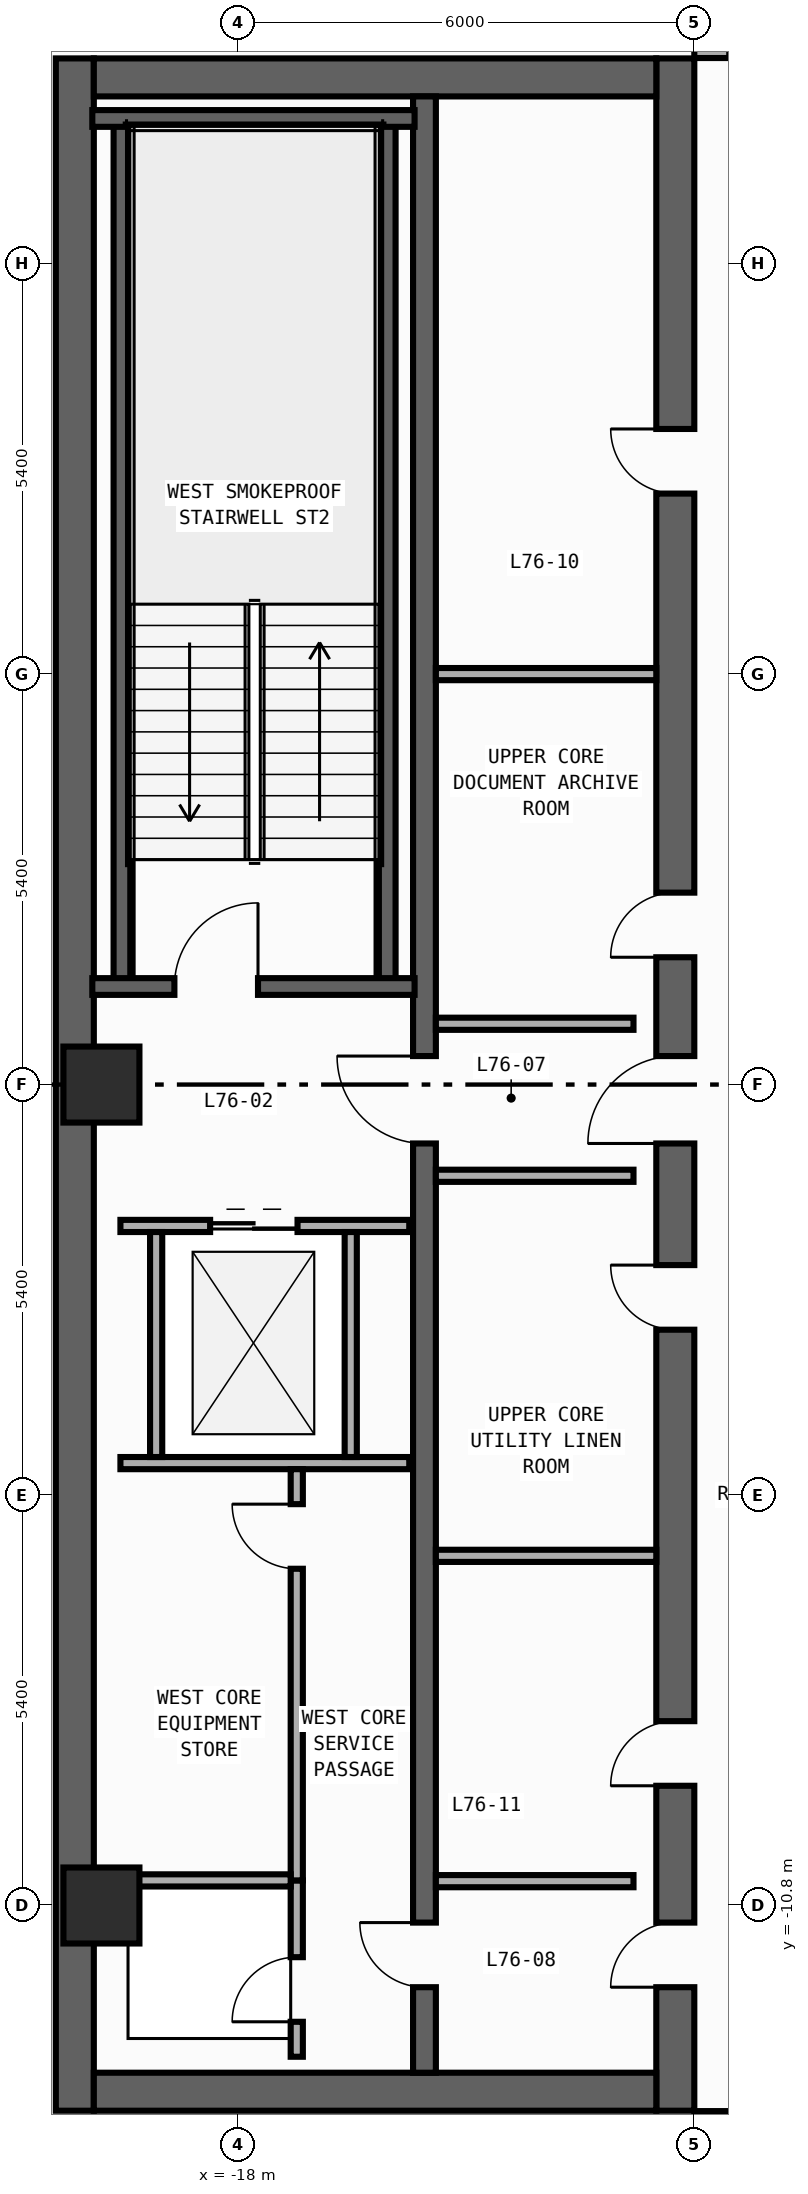
"""IFC4 building model, lengths in metres.
Left out: names, types, materials, properties, quantities, classifications, styles, units other than length and angle.
Written with IfcOpenShell. Run it as: python <this file> out.ifc"""

import sys

from ifc_helpers import new_model, si_unit, direction, frame, frame_2d, origin, origin_2d, place, context, subcontext, project, spatial, rectangle, circle, extrude, element, fill, save


model = new_model("IFC4")
c1 = context("Model", 3, precision=1e-05, world=origin(), true_north=direction((0.0, 1.0)))
c2 = subcontext(c1, "Body", "Model", "MODEL_VIEW")
j1 = project(units=[si_unit("LENGTHUNIT", "METRE"), si_unit("PLANEANGLEUNIT", "RADIAN")], contexts=[c1])
p1 = place(None, origin())
s1 = spatial("IfcSite", under=j1, at=p1, CompositionType="ELEMENT")
p2 = place(p1, origin())
s2 = spatial("IfcBuilding", under=s1, at=p2, CompositionType="ELEMENT")
p3 = place(p2, frame((0.0, 0.0, 315.6)))
s3 = spatial("IfcBuildingStorey", under=s2, at=p3, CompositionType="ELEMENT", Elevation=315.6)
p4 = place(p3, frame((-20.15, -13.5, 0.0), z_axis=(0.0, 0.0, 1.0), x_axis=(0.0, 1.0, 0.0)))
e1 = element("IfcWall", 1, at=p4, inside=s3, PredefinedType="SHEAR", context=c2, shape_type="SweptSolid", body=[
    extrude(rectangle(XDim=27.0, YDim=0.5, at=frame_2d((13.5, 0.0))), origin(), (0.0, 0.0, 1.0), 4.54),
])
p5 = place(p3, frame((-12.25, -13.5, 0.0), z_axis=(0.0, 0.0, 1.0), x_axis=(0.0, 1.0, 0.0)))
e2 = element("IfcWall", 2, at=p5, inside=s3, PredefinedType="SHEAR", context=c2, shape_type="SweptSolid", body=[
    extrude(rectangle(XDim=27.0, YDim=0.5, at=frame_2d((13.5, 0.0))), origin(), (0.0, 0.0, 1.0), 4.54),
])
p6 = place(p5, frame((15.175, 0.0, 0.0)))
e3 = element("IfcOpeningElement", 3, at=p6, cuts=e2, PredefinedType="OPENING", context=c2, shape_type="SweptSolid", body=[
    extrude(rectangle(XDim=0.85, YDim=2.1, at=frame_2d((0.425, 1.05))), frame((0.0, 0.26, 0.0), z_axis=(0.0, -1.0, 0.0), x_axis=(1.0, 0.0, 0.0)), (0.0, 0.0, 1.0), 0.52),
])
p7 = place(p5, frame((21.275, 0.0, 0.0)))
e4 = element("IfcOpeningElement", 4, at=p7, cuts=e2, PredefinedType="OPENING", context=c2, shape_type="SweptSolid", body=[
    extrude(rectangle(XDim=0.85, YDim=2.1, at=frame_2d((0.425, 1.05))), frame((0.0, 0.26, 0.0), z_axis=(0.0, -1.0, 0.0), x_axis=(1.0, 0.0, 0.0)), (0.0, 0.0, 1.0), 0.52),
])
p8 = place(p5, frame((4.275, 0.0, 0.0)))
e5 = element("IfcOpeningElement", 5, at=p8, cuts=e2, PredefinedType="OPENING", context=c2, shape_type="SweptSolid", body=[
    extrude(rectangle(XDim=0.85, YDim=2.1, at=frame_2d((0.425, 1.05))), frame((0.0, 0.26, 0.0), z_axis=(0.0, -1.0, 0.0), x_axis=(1.0, 0.0, 0.0)), (0.0, 0.0, 1.0), 0.52),
])
p9 = place(p5, frame((10.275, 0.0, 0.0)))
e6 = element("IfcOpeningElement", 6, at=p9, cuts=e2, PredefinedType="OPENING", context=c2, shape_type="SweptSolid", body=[
    extrude(rectangle(XDim=0.85, YDim=2.1, at=frame_2d((0.425, 1.05))), frame((0.0, 0.26, 0.0), z_axis=(0.0, -1.0, 0.0), x_axis=(1.0, 0.0, 0.0)), (0.0, 0.0, 1.0), 0.52),
])
p10 = place(p5, frame((12.725, 0.0, 0.0)))
e7 = element("IfcOpeningElement", 7, at=p10, cuts=e2, PredefinedType="OPENING", context=c2, shape_type="SweptSolid", body=[
    extrude(rectangle(XDim=1.15, YDim=2.2, at=frame_2d((0.575, 1.1))), frame((0.0, 0.26, 0.0), z_axis=(0.0, -1.0, 0.0), x_axis=(1.0, 0.0, 0.0)), (0.0, 0.0, 1.0), 0.52),
])
p11 = place(p5, frame((1.625, 0.0, 0.0)))
e8 = element("IfcOpeningElement", 8, at=p11, cuts=e2, PredefinedType="OPENING", context=c2, shape_type="SweptSolid", body=[
    extrude(rectangle(XDim=0.85, YDim=2.1, at=frame_2d((0.425, 1.05))), frame((0.0, 0.26, 0.0), z_axis=(0.0, -1.0, 0.0), x_axis=(1.0, 0.0, 0.0)), (0.0, 0.0, 1.0), 0.52),
])
for number, where, z_axis, x_axis in (
    (9, (-19.9, -13.25, 0.0), (0.0, 0.0, 1.0), (1.0, 0.0, 0.0)),
    (10, (-19.9, 13.25, 0.0), (0.0, 0.0, 1.0), (1.0, 0.0, 0.0)),
):
    element("IfcWall", number, at=place(p3, frame(where, z_axis=z_axis, x_axis=x_axis)), inside=s3, PredefinedType="SHEAR", context=c2, shape_type="SweptSolid", body=[
        extrude(rectangle(XDim=7.4, YDim=0.5, at=frame_2d((3.7, 0.0))), origin(), (0.0, 0.0, 1.0), 4.54),
    ])
p12 = place(p3, frame((-15.55, -13.0, 0.0), z_axis=(0.0, 0.0, 1.0), x_axis=(0.0, 1.0, 0.0)))
e11 = element("IfcWall", 11, at=p12, inside=s3, PredefinedType="SHEAR", context=c2, shape_type="SweptSolid", body=[
    extrude(rectangle(XDim=26.0, YDim=0.3, at=frame_2d((13.0, 0.0))), origin(), (0.0, 0.0, 1.0), 4.54),
])
p13 = place(p12, frame((12.225, 0.0, 0.0)))
e12 = element("IfcOpeningElement", 12, at=p13, cuts=e11, PredefinedType="OPENING", context=c2, shape_type="SweptSolid", body=[
    extrude(rectangle(XDim=1.15, YDim=2.2, at=frame_2d((0.575, 1.1))), frame((0.0, 0.16, 0.0), z_axis=(0.0, -1.0, 0.0), x_axis=(1.0, 0.0, 0.0)), (0.0, 0.0, 1.0), 0.32),
])
p14 = place(p12, frame((1.125, 0.0, 0.0)))
e13 = element("IfcOpeningElement", 13, at=p14, cuts=e11, PredefinedType="OPENING", context=c2, shape_type="SweptSolid", body=[
    extrude(rectangle(XDim=0.85, YDim=2.1, at=frame_2d((0.425, 1.05))), frame((0.0, 0.16, 0.0), z_axis=(0.0, -1.0, 0.0), x_axis=(1.0, 0.0, 0.0)), (0.0, 0.0, 1.0), 0.32),
])
for number, where, z_axis, x_axis in (
    (14, (-16.04, 1.29, 0.0), (0.0, 0.0, 1.0), (0.0, 1.0, 0.0)),
    (15, (-19.53, 1.29, 0.0), (0.0, 0.0, 1.0), (0.0, 1.0, 0.0)),
):
    element("IfcWall", number, at=place(p3, frame(where, z_axis=z_axis, x_axis=x_axis)), inside=s3, PredefinedType="SHEAR", context=c2, shape_type="SweptSolid", body=[
        extrude(rectangle(XDim=11.42, YDim=0.22, at=frame_2d((5.71, 0.0))), origin(), (0.0, 0.0, 1.0), 4.54),
    ])
p15 = place(p3, frame((-19.92, 12.71, 0.0), z_axis=(0.0, 0.0, 1.0), x_axis=(1.0, 0.0, 0.0)))
e16 = element("IfcWall", 16, at=p15, inside=s3, PredefinedType="SHEAR", context=c2, shape_type="SweptSolid", body=[
    extrude(rectangle(XDim=4.24, YDim=0.22, at=frame_2d((2.12, 0.0))), origin(), (0.0, 0.0, 1.0), 4.54),
])
p16 = place(p3, frame((-19.92, 1.29, 0.0), z_axis=(0.0, 0.0, 1.0), x_axis=(1.0, 0.0, 0.0)))
e17 = element("IfcWall", 17, at=p16, inside=s3, PredefinedType="SHEAR", context=c2, shape_type="SweptSolid", body=[
    extrude(rectangle(XDim=4.24, YDim=0.22, at=frame_2d((2.12, 0.0))), origin(), (0.0, 0.0, 1.0), 4.54),
])
p17 = place(p16, frame((1.08, 0.0, 0.0)))
e18 = element("IfcOpeningElement", 18, at=p17, cuts=e17, PredefinedType="OPENING", context=c2, shape_type="SweptSolid", body=[
    extrude(rectangle(XDim=1.1, YDim=2.2, at=frame_2d((0.55, 1.1))), frame((0.0, 0.12, 0.0), z_axis=(0.0, -1.0, 0.0), x_axis=(1.0, 0.0, 0.0)), (0.0, 0.0, 1.0), 0.24),
])
for number, where, z_axis, x_axis in (
    (19, (-19.8, -10.8, 0.0), (0.0, 0.0, 1.0), (1.0, 0.0, 0.0)),
    (20, (-19.8, 0.0, 0.0), (0.0, 0.0, 1.0), (1.0, 0.0, 0.0)),
):
    element("IfcColumn", number, at=place(p3, frame(where, z_axis=z_axis, x_axis=x_axis)), inside=s3, PredefinedType="COLUMN", context=c2, shape_type="SweptSolid", body=[
        extrude(circle(Radius=0.5, at=origin_2d()), origin(), (0.0, 0.0, 1.0), 4.8),
    ])
p18 = place(p3, frame((-19.55, -1.86, 0.0), z_axis=(0.0, 0.0, 1.0), x_axis=(1.0, 0.0, 0.0)))
e21 = element("IfcWall", 21, at=p18, inside=s3, PredefinedType="STANDARD", context=c2, shape_type="SweptSolid", body=[
    extrude(rectangle(XDim=3.8, YDim=0.16, at=frame_2d((1.9, 0.0))), origin(), (0.0, 0.0, 1.0), 4.54),
])
p19 = place(p18, frame((1.18, 0.0, 0.0)))
e22 = element("IfcOpeningElement", 22, at=p19, cuts=e21, PredefinedType="OPENING", context=c2, shape_type="SweptSolid", body=[
    extrude(rectangle(XDim=1.15, YDim=2.2, at=frame_2d((0.575, 1.1))), frame((0.0, 0.09, 0.0), z_axis=(0.0, -1.0, 0.0), x_axis=(1.0, 0.0, 0.0)), (0.0, 0.0, 1.0), 0.18),
])
p20 = place(p3, frame((-19.55, -4.98, 0.0), z_axis=(0.0, 0.0, 1.0), x_axis=(1.0, 0.0, 0.0)))
e23 = element("IfcWall", 23, at=p20, inside=s3, PredefinedType="STANDARD", context=c2, shape_type="SweptSolid", body=[
    extrude(rectangle(XDim=3.8, YDim=0.16, at=frame_2d((1.9, 0.0))), origin(), (0.0, 0.0, 1.0), 4.54),
])
for number, where, z_axis, x_axis in (
    (24, (-19.08, -4.9, 0.0), (0.0, 0.0, 1.0), (0.0, 1.0, 0.0)),
    (25, (-16.52, -4.9, 0.0), (0.0, 0.0, 1.0), (0.0, 1.0, 0.0)),
):
    element("IfcWall", number, at=place(p3, frame(where, z_axis=z_axis, x_axis=x_axis)), inside=s3, PredefinedType="STANDARD", context=c2, shape_type="SweptSolid", body=[
        extrude(rectangle(XDim=2.96, YDim=0.16, at=frame_2d((1.48, 0.0))), origin(), (0.0, 0.0, 1.0), 4.54),
    ])
for number, where, z_axis, x_axis in (
    (26, (-15.4, 0.8, 0.0), (0.0, 0.0, 1.0), (1.0, 0.0, 0.0)),
    (27, (-15.4, -1.2, 0.0), (0.0, 0.0, 1.0), (1.0, 0.0, 0.0)),
    (28, (-15.4, -10.48, 0.0), (0.0, 0.0, 1.0), (1.0, 0.0, 0.0)),
):
    element("IfcWall", number, at=place(p3, frame(where, z_axis=z_axis, x_axis=x_axis)), inside=s3, PredefinedType="STANDARD", context=c2, shape_type="SweptSolid", body=[
        extrude(rectangle(XDim=2.6, YDim=0.16, at=frame_2d((1.3, 0.0))), origin(), (0.0, 0.0, 1.0), 4.54),
    ])
p21 = place(p3, frame((-17.23, -12.79, 0.0), z_axis=(0.0, 0.0, 1.0), x_axis=(0.0, 1.0, 0.0)))
e29 = element("IfcWall", 29, at=p21, inside=s3, PredefinedType="PARTITIONING", context=c2, shape_type="SweptSolid", body=[
    extrude(rectangle(XDim=2.32, YDim=0.16, at=frame_2d((1.16, 0.0))), origin(), (0.0, 0.0, 1.0), 4.54),
])
p22 = place(p21, frame((0.46, 0.0, 0.0)))
e30 = element("IfcOpeningElement", 30, at=p22, cuts=e29, PredefinedType="OPENING", context=c2, shape_type="SweptSolid", body=[
    extrude(rectangle(XDim=0.85, YDim=2.1, at=frame_2d((0.425, 1.05))), frame((0.0, 0.09, 0.0), z_axis=(0.0, -1.0, 0.0), x_axis=(1.0, 0.0, 0.0)), (0.0, 0.0, 1.0), 0.18),
])
p23 = place(p3, frame((-17.23, -10.47, 0.0), z_axis=(0.0, 0.0, 1.0), x_axis=(0.0, 1.0, 0.0)))
e31 = element("IfcWall", 31, at=p23, inside=s3, PredefinedType="PARTITIONING", context=c2, shape_type="SweptSolid", body=[
    extrude(rectangle(XDim=5.41, YDim=0.16, at=frame_2d((2.705, 0.0))), origin(), (0.0, 0.0, 1.0), 4.54),
])
p24 = place(p23, frame((4.1, 0.0, 0.0)))
e32 = element("IfcOpeningElement", 32, at=p24, cuts=e31, PredefinedType="OPENING", context=c2, shape_type="SweptSolid", body=[
    extrude(rectangle(XDim=0.85, YDim=2.1, at=frame_2d((0.425, 1.05))), frame((0.0, 0.09, 0.0), z_axis=(0.0, -1.0, 0.0), x_axis=(1.0, 0.0, 0.0)), (0.0, 0.0, 1.0), 0.18),
])
p25 = place(p3, frame((-19.75, -10.47, 0.0), z_axis=(0.0, 0.0, 1.0), x_axis=(1.0, 0.0, 0.0)))
e33 = element("IfcWall", 33, at=p25, inside=s3, PredefinedType="PARTITIONING", context=c2, shape_type="SweptSolid", body=[
    extrude(rectangle(XDim=2.44, YDim=0.16, at=frame_2d((1.22, 0.0))), origin(), (0.0, 0.0, 1.0), 4.54),
])
for number, where, z_axis, x_axis in (
    (34, (-15.4, 5.4, 0.0), (0.0, 0.0, 1.0), (1.0, 0.0, 0.0)),
    (35, (-15.4, -6.2, 0.0), (0.0, 0.0, 1.0), (1.0, 0.0, 0.0)),
):
    element("IfcWall", number, at=place(p3, frame(where, z_axis=z_axis, x_axis=x_axis)), inside=s3, PredefinedType="PARTITIONING", context=c2, shape_type="SweptSolid", body=[
        extrude(rectangle(XDim=2.9, YDim=0.16, at=frame_2d((1.45, 0.0))), origin(), (0.0, 0.0, 1.0), 4.54),
    ])
p26 = place(p3, frame((-12.0, 13.58, 0.0), z_axis=(0.0, 0.0, 1.0), x_axis=(1.0, 0.0, 0.0)))
e36 = element("IfcWall", 36, at=p26, inside=s3, PredefinedType="PARTITIONING", context=c2, shape_type="SweptSolid", body=[
    extrude(rectangle(XDim=2.84, YDim=0.15, at=frame_2d((1.42, 0.0))), origin(), (0.0, 0.0, 1.0), 4.54),
])
p27 = place(p26, frame((0.46, 0.0, 0.0)))
e37 = element("IfcOpeningElement", 37, at=p27, cuts=e36, PredefinedType="OPENING", context=c2, shape_type="SweptSolid", body=[
    extrude(rectangle(XDim=0.9, YDim=2.15, at=frame_2d((0.45, 1.075))), frame((0.0, 0.085, 0.0), z_axis=(0.0, -1.0, 0.0), x_axis=(1.0, 0.0, 0.0)), (0.0, 0.0, 1.0), 0.17),
])
p28 = place(p3, frame((-12.0, -13.58, 0.0), z_axis=(0.0, 0.0, 1.0), x_axis=(1.0, 0.0, 0.0)))
e38 = element("IfcWall", 38, at=p28, inside=s3, PredefinedType="PARTITIONING", context=c2, shape_type="SweptSolid", body=[
    extrude(rectangle(XDim=2.08, YDim=0.15, at=frame_2d((1.04, 0.0))), origin(), (0.0, 0.0, 1.0), 4.54),
])
p29 = place(p28, frame((0.46, 0.0, 0.0)))
e39 = element("IfcOpeningElement", 39, at=p29, cuts=e38, PredefinedType="OPENING", context=c2, shape_type="SweptSolid", body=[
    extrude(rectangle(XDim=0.9, YDim=2.15, at=frame_2d((0.45, 1.075))), frame((0.0, 0.085, 0.0), z_axis=(0.0, -1.0, 0.0), x_axis=(1.0, 0.0, 0.0)), (0.0, 0.0, 1.0), 0.17),
])
p30 = place(p17, origin())
e40 = element("IfcDoor", 40, at=p30, inside=s3, OperationType="SINGLE_SWING_RIGHT", PredefinedType="DOOR", context=c2, shape_type="SweptSolid", body=[
    extrude(rectangle(XDim=1.1, YDim=2.2, at=frame_2d((0.55, 1.1))), frame((0.0, 0.025, 0.0), z_axis=(0.0, -1.0, 0.0), x_axis=(1.0, 0.0, 0.0)), (0.0, 0.0, 1.0), 0.05),
])
fill(e18, e40)
p31 = place(p6, origin())
e41 = element("IfcDoor", 41, at=p31, inside=s3, OperationType="SINGLE_SWING_LEFT", PredefinedType="DOOR", context=c2, shape_type="SweptSolid", body=[
    extrude(rectangle(XDim=0.85, YDim=2.1, at=frame_2d((0.425, 1.05))), frame((0.0, 0.025, 0.0), z_axis=(0.0, -1.0, 0.0), x_axis=(1.0, 0.0, 0.0)), (0.0, 0.0, 1.0), 0.05),
])
fill(e3, e41)
p32 = place(p7, origin())
e42 = element("IfcDoor", 42, at=p32, inside=s3, OperationType="SINGLE_SWING_RIGHT", PredefinedType="DOOR", context=c2, shape_type="SweptSolid", body=[
    extrude(rectangle(XDim=0.85, YDim=2.1, at=frame_2d((0.425, 1.05))), frame((0.0, 0.025, 0.0), z_axis=(0.0, -1.0, 0.0), x_axis=(1.0, 0.0, 0.0)), (0.0, 0.0, 1.0), 0.05),
])
fill(e4, e42)
p33 = place(p8, origin())
e43 = element("IfcDoor", 43, at=p33, inside=s3, OperationType="SINGLE_SWING_LEFT", PredefinedType="DOOR", context=c2, shape_type="SweptSolid", body=[
    extrude(rectangle(XDim=0.85, YDim=2.1, at=frame_2d((0.425, 1.05))), frame((0.0, 0.025, 0.0), z_axis=(0.0, -1.0, 0.0), x_axis=(1.0, 0.0, 0.0)), (0.0, 0.0, 1.0), 0.05),
])
fill(e5, e43)
p34 = place(p9, origin())
e44 = element("IfcDoor", 44, at=p34, inside=s3, OperationType="SINGLE_SWING_RIGHT", PredefinedType="DOOR", context=c2, shape_type="SweptSolid", body=[
    extrude(rectangle(XDim=0.85, YDim=2.1, at=frame_2d((0.425, 1.05))), frame((0.0, 0.025, 0.0), z_axis=(0.0, -1.0, 0.0), x_axis=(1.0, 0.0, 0.0)), (0.0, 0.0, 1.0), 0.05),
])
fill(e6, e44)
p35 = place(p10, origin())
e45 = element("IfcDoor", 45, at=p35, inside=s3, OperationType="SINGLE_SWING_LEFT", PredefinedType="DOOR", context=c2, shape_type="SweptSolid", body=[
    extrude(rectangle(XDim=1.15, YDim=2.2, at=frame_2d((0.575, 1.1))), frame((0.0, 0.025, 0.0), z_axis=(0.0, -1.0, 0.0), x_axis=(1.0, 0.0, 0.0)), (0.0, 0.0, 1.0), 0.05),
])
fill(e7, e45)
p36 = place(p13, origin())
e46 = element("IfcDoor", 46, at=p36, inside=s3, OperationType="SINGLE_SWING_RIGHT", PredefinedType="DOOR", context=c2, shape_type="SweptSolid", body=[
    extrude(rectangle(XDim=1.15, YDim=2.2, at=frame_2d((0.575, 1.1))), frame((0.0, 0.025, 0.0), z_axis=(0.0, -1.0, 0.0), x_axis=(1.0, 0.0, 0.0)), (0.0, 0.0, 1.0), 0.05),
])
fill(e12, e46)
p37 = place(p11, origin())
e47 = element("IfcDoor", 47, at=p37, inside=s3, OperationType="SINGLE_SWING_LEFT", PredefinedType="DOOR", context=c2, shape_type="SweptSolid", body=[
    extrude(rectangle(XDim=0.85, YDim=2.1, at=frame_2d((0.425, 1.05))), frame((0.0, 0.025, 0.0), z_axis=(0.0, -1.0, 0.0), x_axis=(1.0, 0.0, 0.0)), (0.0, 0.0, 1.0), 0.05),
])
fill(e8, e47)
p38 = place(p14, origin())
e48 = element("IfcDoor", 48, at=p38, inside=s3, OperationType="SINGLE_SWING_RIGHT", PredefinedType="DOOR", context=c2, shape_type="SweptSolid", body=[
    extrude(rectangle(XDim=0.85, YDim=2.1, at=frame_2d((0.425, 1.05))), frame((0.0, 0.025, 0.0), z_axis=(0.0, -1.0, 0.0), x_axis=(1.0, 0.0, 0.0)), (0.0, 0.0, 1.0), 0.05),
])
fill(e13, e48)
p39 = place(p19, origin())
e49 = element("IfcDoor", 49, at=p39, inside=s3, OperationType="DOUBLE_DOOR_SLIDING", PredefinedType="DOOR", context=c2, shape_type="SweptSolid", body=[
    extrude(rectangle(XDim=1.15, YDim=2.2, at=frame_2d((0.575, 1.1))), frame((0.0, 0.025, 0.0), z_axis=(0.0, -1.0, 0.0), x_axis=(1.0, 0.0, 0.0)), (0.0, 0.0, 1.0), 0.05),
])
fill(e22, e49)
p40 = place(p22, origin())
e50 = element("IfcDoor", 50, at=p40, inside=s3, OperationType="SINGLE_SWING_LEFT", PredefinedType="DOOR", context=c2, shape_type="SweptSolid", body=[
    extrude(rectangle(XDim=0.85, YDim=2.1, at=frame_2d((0.425, 1.05))), frame((0.0, 0.025, 0.0), z_axis=(0.0, -1.0, 0.0), x_axis=(1.0, 0.0, 0.0)), (0.0, 0.0, 1.0), 0.05),
])
fill(e30, e50)
p41 = place(p24, origin())
e51 = element("IfcDoor", 51, at=p41, inside=s3, OperationType="SINGLE_SWING_RIGHT", PredefinedType="DOOR", context=c2, shape_type="SweptSolid", body=[
    extrude(rectangle(XDim=0.85, YDim=2.1, at=frame_2d((0.425, 1.05))), frame((0.0, 0.025, 0.0), z_axis=(0.0, -1.0, 0.0), x_axis=(1.0, 0.0, 0.0)), (0.0, 0.0, 1.0), 0.05),
])
fill(e32, e51)
save(model, sys.argv[1])
